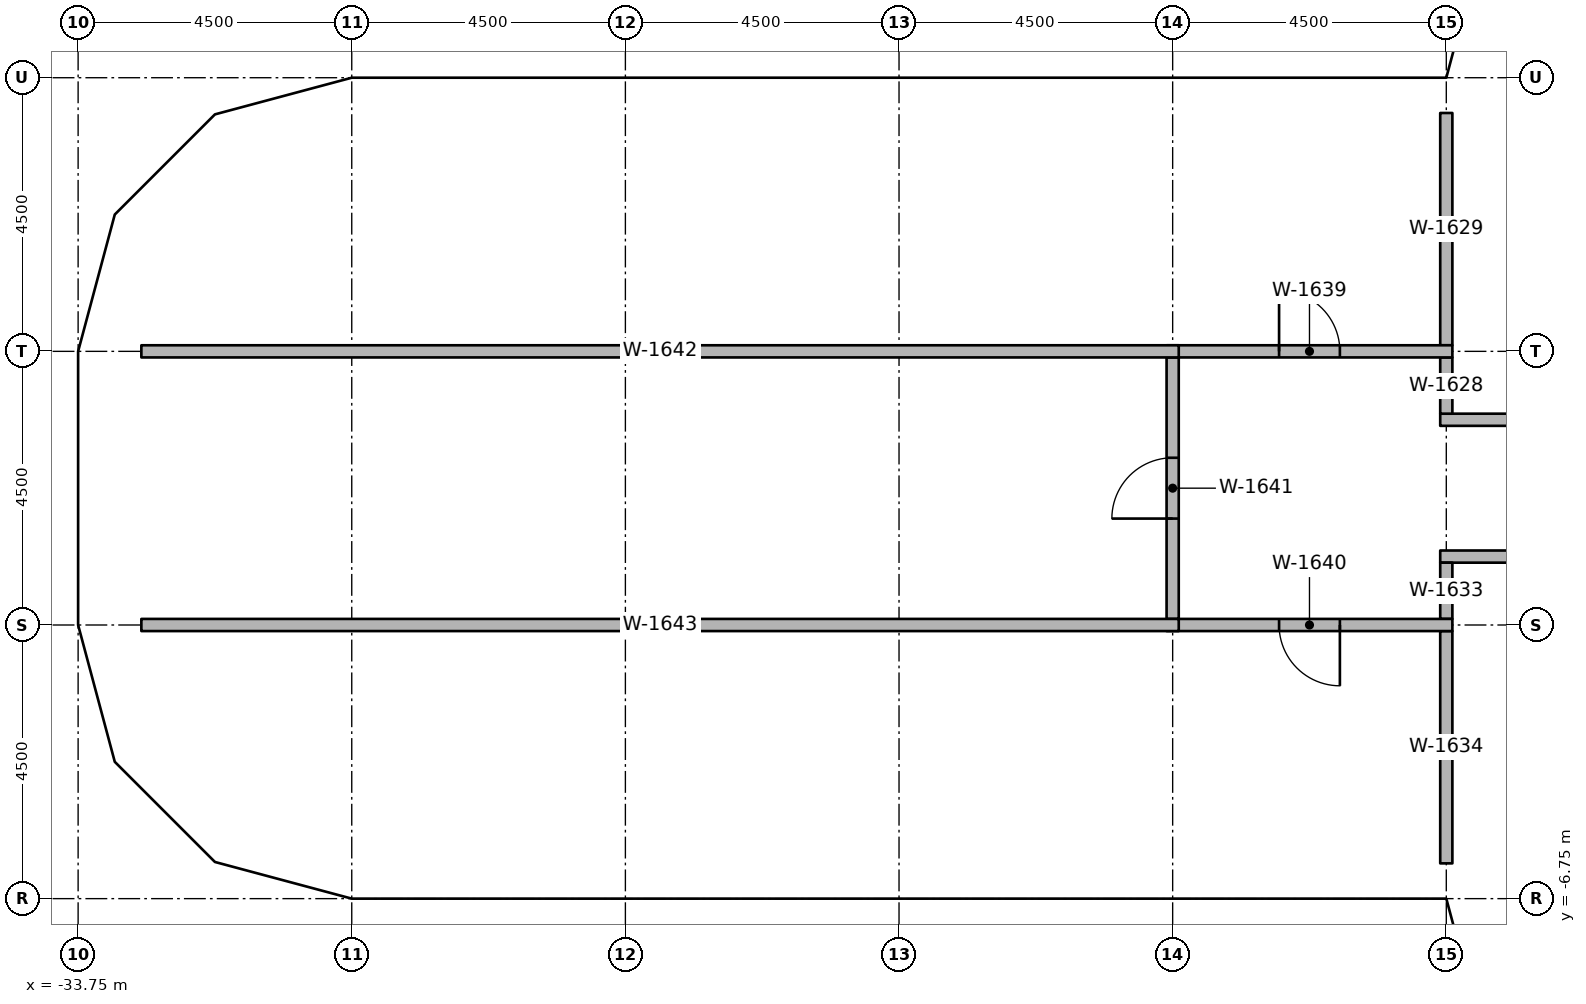
"""IFC4 building model, lengths in metres.
Left out: names, types, materials, properties, quantities, classifications, styles, units other than length and angle.
Written with IfcOpenShell. Run it as: python <this file> out.ifc"""

import sys

from ifc_helpers import new_model, si_unit, direction, frame, frame_2d, origin, origin_2d, place, context, subcontext, project, spatial, rectangle, extrude, element, fill, save


model = new_model("IFC4")
c1 = context("Model", 3, precision=1e-05, world=origin(), true_north=direction((0.0, 1.0)))
c2 = subcontext(c1, "Body", "Model", "MODEL_VIEW")
j1 = project(units=[si_unit("LENGTHUNIT", "METRE"), si_unit("PLANEANGLEUNIT", "RADIAN")], contexts=[c1])
p1 = place(None, origin())
s1 = spatial("IfcSite", under=j1, at=p1, CompositionType="ELEMENT")
p2 = place(p1, origin())
s2 = spatial("IfcBuilding", under=s1, at=p2, CompositionType="ELEMENT")
p3 = place(p2, frame((0.0, 0.0, 156.2)))
s3 = spatial("IfcBuildingStorey", under=s2, at=p3, CompositionType="ELEMENT", Elevation=156.2)
for number, where, z_axis, x_axis in (
    (1, (-33.11, -2.25, 0.0), (0.0, 0.0, 1.0), (1.0, 0.0, 0.0)),
    (2, (-33.11, 2.25, 0.0), (0.0, 0.0, 1.0), (1.0, 0.0, 0.0)),
    (3, (-28.908, -5.475, 0.0), (0.0, 0.0, 1.0), (1.0, 0.0, 0.0)),
    (4, (-28.908, 5.475, 0.0), (0.0, 0.0, 1.0), (1.0, 0.0, 0.0)),
    (5, (-24.75, -6.25, 0.0), (0.0, 0.0, 1.0), (1.0, 0.0, 0.0)),
    (6, (-24.75, 6.25, 0.0), (0.0, 0.0, 1.0), (1.0, 0.0, 0.0)),
    (7, (-20.25, -6.11, 0.0), (0.0, 0.0, 1.0), (1.0, 0.0, 0.0)),
    (8, (-20.25, 6.11, 0.0), (0.0, 0.0, 1.0), (1.0, 0.0, 0.0)),
    (9, (-15.75, -6.25, 0.0), (0.0, 0.0, 1.0), (1.0, 0.0, 0.0)),
    (10, (-15.75, 6.25, 0.0), (0.0, 0.0, 1.0), (1.0, 0.0, 0.0)),
    (11, (-10.75, -6.25, 0.0), (0.0, 0.0, 1.0), (1.0, 0.0, 0.0)),
    (12, (-10.75, 6.25, 0.0), (0.0, 0.0, 1.0), (1.0, 0.0, 0.0)),
):
    element("IfcColumn", number, at=place(p3, frame(where, z_axis=z_axis, x_axis=x_axis)), inside=s3, PredefinedType="COLUMN", context=c2, shape_type="SweptSolid", body=[
        extrude(rectangle(XDim=0.8, YDim=0.8, at=origin_2d()), origin(), (0.0, 0.0, 1.0), 3.65),
    ])
p4 = place(p3, frame((-11.35, 1.125, 0.0), z_axis=(0.0, 0.0, 1.0), x_axis=(1.0, 0.0, 0.0)))
e13 = element("IfcWall", 13, at=p4, inside=s3, PredefinedType="PARTITIONING", context=c2, shape_type="SweptSolid", body=[
    extrude(rectangle(XDim=4.7, YDim=0.2, at=frame_2d((2.35, 0.0))), origin(), (0.0, 0.0, 1.0), 2.75),
])
p5 = place(p4, frame((1.85, 0.0, 0.0)))
e14 = element("IfcOpeningElement", 14, at=p5, cuts=e13, PredefinedType="OPENING", context=c2, shape_type="SweptSolid", body=[
    extrude(rectangle(XDim=1.0, YDim=2.1, at=frame_2d((0.5, 1.05))), frame((0.0, 0.11, 0.0), z_axis=(0.0, -1.0, 0.0), x_axis=(1.0, 0.0, 0.0)), (0.0, 0.0, 1.0), 0.22),
])
p6 = place(p3, frame((-6.65, -1.125, 0.0), z_axis=(0.0, 0.0, 1.0), x_axis=(-1.0, 0.0, 0.0)))
e15 = element("IfcWall", 15, at=p6, inside=s3, PredefinedType="PARTITIONING", context=c2, shape_type="SweptSolid", body=[
    extrude(rectangle(XDim=4.7, YDim=0.2, at=frame_2d((2.35, 0.0))), origin(), (0.0, 0.0, 1.0), 2.75),
])
p7 = place(p6, frame((1.85, 0.0, 0.0)))
e16 = element("IfcOpeningElement", 16, at=p7, cuts=e15, PredefinedType="OPENING", context=c2, shape_type="SweptSolid", body=[
    extrude(rectangle(XDim=1.0, YDim=2.1, at=frame_2d((0.5, 1.05))), frame((0.0, 0.11, 0.0), z_axis=(0.0, -1.0, 0.0), x_axis=(1.0, 0.0, 0.0)), (0.0, 0.0, 1.0), 0.22),
])
p8 = place(p3, frame((-11.25, 1.225, 0.0), z_axis=(0.0, 0.0, 1.0), x_axis=(0.0, 1.0, 0.0)))
e17 = element("IfcWall", 17, at=p8, inside=s3, PredefinedType="PARTITIONING", context=c2, shape_type="SweptSolid", body=[
    extrude(rectangle(XDim=0.925, YDim=0.2, at=frame_2d((0.462, 0.0))), origin(), (0.0, 0.0, 1.0), 2.75),
])
p9 = place(p3, frame((-11.25, 2.35, 0.0), z_axis=(0.0, 0.0, 1.0), x_axis=(0.0, 1.0, 0.0)))
e18 = element("IfcWall", 18, at=p9, inside=s3, PredefinedType="PARTITIONING", context=c2, shape_type="SweptSolid", body=[
    extrude(rectangle(XDim=3.82, YDim=0.2, at=frame_2d((1.91, 0.0))), origin(), (0.0, 0.0, 1.0), 2.75),
])
p10 = place(p3, frame((-11.25, -2.15, 0.0), z_axis=(0.0, 0.0, 1.0), x_axis=(0.0, 1.0, 0.0)))
e19 = element("IfcWall", 19, at=p10, inside=s3, PredefinedType="PARTITIONING", context=c2, shape_type="SweptSolid", body=[
    extrude(rectangle(XDim=0.925, YDim=0.2, at=frame_2d((0.462, 0.0))), origin(), (0.0, 0.0, 1.0), 2.75),
])
p11 = place(p3, frame((-11.25, -6.17, 0.0), z_axis=(0.0, 0.0, 1.0), x_axis=(0.0, 1.0, 0.0)))
e20 = element("IfcWall", 20, at=p11, inside=s3, PredefinedType="PARTITIONING", context=c2, shape_type="SweptSolid", body=[
    extrude(rectangle(XDim=3.82, YDim=0.2, at=frame_2d((1.91, 0.0))), origin(), (0.0, 0.0, 1.0), 2.75),
])
p12 = place(p3, frame((-15.85, 2.25, 0.0), z_axis=(0.0, 0.0, 1.0), x_axis=(1.0, 0.0, 0.0)))
e21 = element("IfcWall", 21, at=p12, inside=s3, PredefinedType="PARTITIONING", context=c2, shape_type="SweptSolid", body=[
    extrude(rectangle(XDim=4.7, YDim=0.2, at=frame_2d((2.35, 0.0))), origin(), (0.0, 0.0, 1.0), 2.75),
])
p13 = place(p12, frame((1.85, 0.0, 0.0)))
e22 = element("IfcOpeningElement", 22, at=p13, cuts=e21, PredefinedType="OPENING", context=c2, shape_type="SweptSolid", body=[
    extrude(rectangle(XDim=1.0, YDim=2.1, at=frame_2d((0.5, 1.05))), frame((0.0, 0.11, 0.0), z_axis=(0.0, -1.0, 0.0), x_axis=(1.0, 0.0, 0.0)), (0.0, 0.0, 1.0), 0.22),
])
p14 = place(p3, frame((-11.15, -2.25, 0.0), z_axis=(0.0, 0.0, 1.0), x_axis=(-1.0, 0.0, 0.0)))
e23 = element("IfcWall", 23, at=p14, inside=s3, PredefinedType="PARTITIONING", context=c2, shape_type="SweptSolid", body=[
    extrude(rectangle(XDim=4.7, YDim=0.2, at=frame_2d((2.35, 0.0))), origin(), (0.0, 0.0, 1.0), 2.75),
])
p15 = place(p14, frame((1.85, 0.0, 0.0)))
e24 = element("IfcOpeningElement", 24, at=p15, cuts=e23, PredefinedType="OPENING", context=c2, shape_type="SweptSolid", body=[
    extrude(rectangle(XDim=1.0, YDim=2.1, at=frame_2d((0.5, 1.05))), frame((0.0, 0.11, 0.0), z_axis=(0.0, -1.0, 0.0), x_axis=(1.0, 0.0, 0.0)), (0.0, 0.0, 1.0), 0.22),
])
p16 = place(p3, frame((-15.75, -2.15, 0.0), z_axis=(0.0, 0.0, 1.0), x_axis=(0.0, 1.0, 0.0)))
e25 = element("IfcWall", 25, at=p16, inside=s3, PredefinedType="PARTITIONING", context=c2, shape_type="SweptSolid", body=[
    extrude(rectangle(XDim=4.3, YDim=0.2, at=frame_2d((2.15, 0.0))), origin(), (0.0, 0.0, 1.0), 2.75),
])
p17 = place(p16, frame((1.65, 0.0, 0.0)))
e26 = element("IfcOpeningElement", 26, at=p17, cuts=e25, PredefinedType="OPENING", context=c2, shape_type="SweptSolid", body=[
    extrude(rectangle(XDim=1.0, YDim=2.1, at=frame_2d((0.5, 1.05))), frame((0.0, 0.11, 0.0), z_axis=(0.0, -1.0, 0.0), x_axis=(1.0, 0.0, 0.0)), (0.0, 0.0, 1.0), 0.22),
])
for number, where, z_axis, x_axis in (
    (27, (-32.71, 2.25, 0.0), (0.0, 0.0, 1.0), (1.0, 0.0, 0.0)),
    (28, (-32.71, -2.25, 0.0), (0.0, 0.0, 1.0), (1.0, 0.0, 0.0)),
):
    element("IfcWall", number, at=place(p3, frame(where, z_axis=z_axis, x_axis=x_axis)), inside=s3, PredefinedType="PARTITIONING", context=c2, shape_type="SweptSolid", body=[
        extrude(rectangle(XDim=17.06, YDim=0.2, at=frame_2d((8.53, 0.0))), origin(), (0.0, 0.0, 1.0), 2.75),
    ])
p18 = place(p17, origin())
e29 = element("IfcDoor", 29, at=p18, inside=s3, OperationType="SINGLE_SWING_RIGHT", PredefinedType="DOOR", context=c2, shape_type="SweptSolid", body=[
    extrude(rectangle(XDim=1.0, YDim=2.1, at=frame_2d((0.5, 1.05))), frame((0.0, 0.025, 0.0), z_axis=(0.0, -1.0, 0.0), x_axis=(1.0, 0.0, 0.0)), (0.0, 0.0, 1.0), 0.05),
])
fill(e26, e29)
p19 = place(p13, origin())
e30 = element("IfcDoor", 30, at=p19, inside=s3, OperationType="SINGLE_SWING_RIGHT", PredefinedType="DOOR", context=c2, shape_type="SweptSolid", body=[
    extrude(rectangle(XDim=1.0, YDim=2.1, at=frame_2d((0.5, 1.05))), frame((0.0, 0.025, 0.0), z_axis=(0.0, -1.0, 0.0), x_axis=(1.0, 0.0, 0.0)), (0.0, 0.0, 1.0), 0.05),
])
fill(e22, e30)
p20 = place(p15, origin())
e31 = element("IfcDoor", 31, at=p20, inside=s3, OperationType="SINGLE_SWING_RIGHT", PredefinedType="DOOR", context=c2, shape_type="SweptSolid", body=[
    extrude(rectangle(XDim=1.0, YDim=2.1, at=frame_2d((0.5, 1.05))), frame((0.0, 0.025, 0.0), z_axis=(0.0, -1.0, 0.0), x_axis=(1.0, 0.0, 0.0)), (0.0, 0.0, 1.0), 0.05),
])
fill(e24, e31)
save(model, sys.argv[1])
